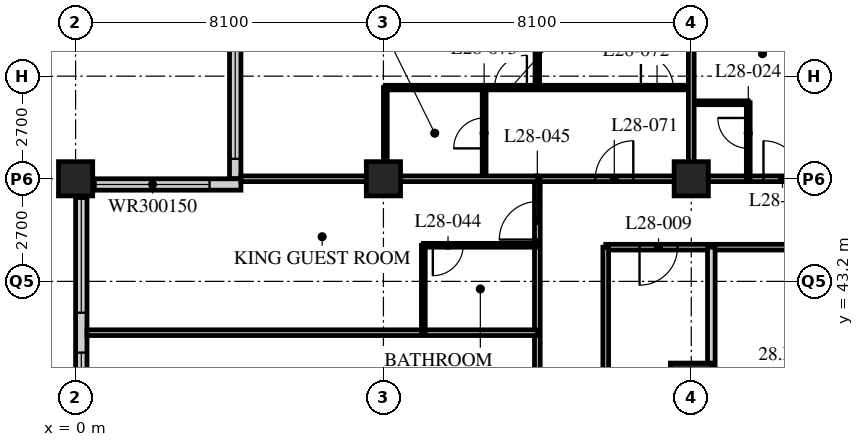
"""IFC4 building model, lengths in metres.
Left out: names, types, materials, properties, quantities, classifications, styles, units other than length and angle.
Written with IfcOpenShell. Run it as: python <this file> out.ifc"""

import sys

from ifc_helpers import new_model, si_unit, direction, frame, frame_2d, origin, origin_2d, place, context, subcontext, project, spatial, rectangle, hollow_rectangle, extrude, element, fill, save


model = new_model("IFC4")
c1 = context("Model", 3, precision=1e-05, world=origin(), true_north=direction((0.0, 1.0)))
c2 = subcontext(c1, "Body", "Model", "MODEL_VIEW")
j1 = project(units=[si_unit("LENGTHUNIT", "METRE"), si_unit("PLANEANGLEUNIT", "RADIAN")], contexts=[c1])
p1 = place(None, origin())
s1 = spatial("IfcSite", under=j1, at=p1, CompositionType="ELEMENT")
p2 = place(p1, origin())
s2 = spatial("IfcBuilding", under=s1, at=p2, CompositionType="ELEMENT")
p3 = place(p2, frame((0.0, 0.0, 113.6)))
s3 = spatial("IfcBuildingStorey", under=s2, at=p3, CompositionType="ELEMENT", Elevation=113.6)
for number, where, z_axis, x_axis in (
    (1, (0.0, 45.9, 0.0), (0.0, 0.0, 1.0), (1.0, 0.0, 0.0)),
    (2, (8.1, 45.9, 0.0), (0.0, 0.0, 1.0), (1.0, 0.0, 0.0)),
):
    element("IfcColumn", number, at=place(p3, frame(where, z_axis=z_axis, x_axis=x_axis)), inside=s3, PredefinedType="COLUMN", context=c2, shape_type="SweptSolid", body=[
        extrude(hollow_rectangle(XDim=0.9, YDim=0.9, WallThickness=0.09, at=origin_2d()), origin(), (0.0, 0.0, 1.0), 3.4),
    ])
p4 = place(p3, frame((16.2, 40.5, 0.0), z_axis=(0.0, 0.0, 1.0), x_axis=(1.0, 0.0, 0.0)))
e3 = element("IfcColumn", 3, at=p4, inside=s3, PredefinedType="COLUMN", context=c2, shape_type="SweptSolid", body=[
    extrude(hollow_rectangle(XDim=1.1, YDim=1.1, WallThickness=0.1, at=origin_2d()), origin(), (0.0, 0.0, 1.0), 3.4),
])
p5 = place(p3, frame((16.2, 45.9, 0.0), z_axis=(0.0, 0.0, 1.0), x_axis=(1.0, 0.0, 0.0)))
e4 = element("IfcColumn", 4, at=p5, inside=s3, PredefinedType="COLUMN", context=c2, shape_type="SweptSolid", body=[
    extrude(hollow_rectangle(XDim=0.9, YDim=0.9, WallThickness=0.09, at=origin_2d()), origin(), (0.0, 0.0, 1.0), 3.4),
])
p6 = place(p3, frame((4.2, 49.65, 0.0), z_axis=(0.0, 0.0, 1.0), x_axis=(0.0, -1.0, 0.0)))
e5 = element("IfcWall", 5, at=p6, inside=s3, PredefinedType="SOLIDWALL", context=c2, shape_type="SweptSolid", body=[
    extrude(rectangle(XDim=3.75, YDim=0.3, at=frame_2d((1.875, 0.0))), origin(), (0.0, 0.0, 1.0), 3.19),
])
p7 = place(p6, frame((0.225, 0.0, 0.9)))
e6 = element("IfcOpeningElement", 6, at=p7, cuts=e5, PredefinedType="OPENING", context=c2, shape_type="SweptSolid", body=[
    extrude(rectangle(XDim=3.0, YDim=1.5, at=frame_2d((1.5, 0.75))), frame((0.0, 0.16, 0.0), z_axis=(0.0, -1.0, 0.0), x_axis=(1.0, 0.0, 0.0)), (0.0, 0.0, 1.0), 0.32),
])
p8 = place(p3, frame((4.35, 45.75, 0.0), z_axis=(0.0, 0.0, 1.0), x_axis=(-1.0, 0.0, 0.0)))
e7 = element("IfcWall", 7, at=p8, inside=s3, PredefinedType="SOLIDWALL", context=c2, shape_type="SweptSolid", body=[
    extrude(rectangle(XDim=4.35, YDim=0.3, at=frame_2d((2.175, 0.0))), origin(), (0.0, 0.0, 1.0), 3.19),
])
p9 = place(p8, frame((0.825, 0.0, 0.9)))
e8 = element("IfcOpeningElement", 8, at=p9, cuts=e7, PredefinedType="OPENING", context=c2, shape_type="SweptSolid", body=[
    extrude(rectangle(XDim=3.0, YDim=1.5, at=frame_2d((1.5, 0.75))), frame((0.0, 0.16, 0.0), z_axis=(0.0, -1.0, 0.0), x_axis=(1.0, 0.0, 0.0)), (0.0, 0.0, 1.0), 0.32),
])
p10 = place(p3, frame((0.15, 45.6, 0.0), z_axis=(0.0, 0.0, 1.0), x_axis=(0.0, -1.0, 0.0)))
e9 = element("IfcWall", 9, at=p10, inside=s3, PredefinedType="SOLIDWALL", context=c2, shape_type="SweptSolid", body=[
    extrude(rectangle(XDim=32.1, YDim=0.3, at=frame_2d((16.05, 0.0))), origin(), (0.0, 0.0, 1.0), 3.19),
])
p11 = place(p10, frame((0.225, 0.0, 0.9)))
e10 = element("IfcOpeningElement", 10, at=p11, cuts=e9, PredefinedType="OPENING", context=c2, shape_type="SweptSolid", body=[
    extrude(rectangle(XDim=3.0, YDim=2.0, at=frame_2d((1.5, 1.0))), frame((0.0, 0.16, 0.0), z_axis=(0.0, -1.0, 0.0), x_axis=(1.0, 0.0, 0.0)), (0.0, 0.0, 1.0), 0.32),
])
p12 = place(p10, frame((4.275, 0.0, 0.9)))
e11 = element("IfcOpeningElement", 11, at=p12, cuts=e9, PredefinedType="OPENING", context=c2, shape_type="SweptSolid", body=[
    extrude(rectangle(XDim=3.0, YDim=2.0, at=frame_2d((1.5, 1.0))), frame((0.0, 0.16, 0.0), z_axis=(0.0, -1.0, 0.0), x_axis=(1.0, 0.0, 0.0)), (0.0, 0.0, 1.0), 0.32),
])
p13 = place(p10, frame((8.325, 0.0, 0.9)))
e12 = element("IfcOpeningElement", 12, at=p13, cuts=e9, PredefinedType="OPENING", context=c2, shape_type="SweptSolid", body=[
    extrude(rectangle(XDim=3.0, YDim=2.0, at=frame_2d((1.5, 1.0))), frame((0.0, 0.16, 0.0), z_axis=(0.0, -1.0, 0.0), x_axis=(1.0, 0.0, 0.0)), (0.0, 0.0, 1.0), 0.32),
])
p14 = place(p10, frame((12.375, 0.0, 0.9)))
e13 = element("IfcOpeningElement", 13, at=p14, cuts=e9, PredefinedType="OPENING", context=c2, shape_type="SweptSolid", body=[
    extrude(rectangle(XDim=3.0, YDim=2.0, at=frame_2d((1.5, 1.0))), frame((0.0, 0.16, 0.0), z_axis=(0.0, -1.0, 0.0), x_axis=(1.0, 0.0, 0.0)), (0.0, 0.0, 1.0), 0.32),
])
p15 = place(p10, frame((16.425, 0.0, 0.9)))
e14 = element("IfcOpeningElement", 14, at=p15, cuts=e9, PredefinedType="OPENING", context=c2, shape_type="SweptSolid", body=[
    extrude(rectangle(XDim=3.0, YDim=2.0, at=frame_2d((1.5, 1.0))), frame((0.0, 0.16, 0.0), z_axis=(0.0, -1.0, 0.0), x_axis=(1.0, 0.0, 0.0)), (0.0, 0.0, 1.0), 0.32),
])
p16 = place(p10, frame((20.475, 0.0, 0.9)))
e15 = element("IfcOpeningElement", 15, at=p16, cuts=e9, PredefinedType="OPENING", context=c2, shape_type="SweptSolid", body=[
    extrude(rectangle(XDim=3.0, YDim=2.0, at=frame_2d((1.5, 1.0))), frame((0.0, 0.16, 0.0), z_axis=(0.0, -1.0, 0.0), x_axis=(1.0, 0.0, 0.0)), (0.0, 0.0, 1.0), 0.32),
])
p17 = place(p10, frame((24.525, 0.0, 0.9)))
e16 = element("IfcOpeningElement", 16, at=p17, cuts=e9, PredefinedType="OPENING", context=c2, shape_type="SweptSolid", body=[
    extrude(rectangle(XDim=3.0, YDim=2.0, at=frame_2d((1.5, 1.0))), frame((0.0, 0.16, 0.0), z_axis=(0.0, -1.0, 0.0), x_axis=(1.0, 0.0, 0.0)), (0.0, 0.0, 1.0), 0.32),
])
p18 = place(p10, frame((28.575, 0.0, 0.9)))
e17 = element("IfcOpeningElement", 17, at=p18, cuts=e9, PredefinedType="OPENING", context=c2, shape_type="SweptSolid", body=[
    extrude(rectangle(XDim=3.0, YDim=2.0, at=frame_2d((1.5, 1.0))), frame((0.0, 0.16, 0.0), z_axis=(0.0, -1.0, 0.0), x_axis=(1.0, 0.0, 0.0)), (0.0, 0.0, 1.0), 0.32),
])
p19 = place(p3, frame((12.15, 45.9, 0.0), z_axis=(0.0, 0.0, 1.0), x_axis=(1.0, 0.0, 0.0)))
e18 = element("IfcWall", 18, at=p19, inside=s3, PredefinedType="PARTITIONING", context=c2, shape_type="SweptSolid", body=[
    extrude(rectangle(XDim=32.4, YDim=0.15, at=frame_2d((16.2, 0.0))), origin(), (0.0, 0.0, 1.0), 2.578),
])
p20 = place(p19, frame((5.95, 0.0, 0.0)))
e19 = element("IfcOpeningElement", 19, at=p20, cuts=e18, PredefinedType="OPENING", context=c2, shape_type="SweptSolid", body=[
    extrude(rectangle(XDim=1.0, YDim=2.1, at=frame_2d((0.5, 1.05))), frame((0.0, 0.085, 0.0), z_axis=(0.0, -1.0, 0.0), x_axis=(1.0, 0.0, 0.0)), (0.0, 0.0, 1.0), 0.17),
])
p21 = place(p19, frame((14.05, 0.0, 0.0)))
e20 = element("IfcOpeningElement", 20, at=p21, cuts=e18, PredefinedType="OPENING", context=c2, shape_type="SweptSolid", body=[
    extrude(rectangle(XDim=1.0, YDim=2.1, at=frame_2d((0.5, 1.05))), frame((0.0, 0.085, 0.0), z_axis=(0.0, -1.0, 0.0), x_axis=(1.0, 0.0, 0.0)), (0.0, 0.0, 1.0), 0.17),
])
p22 = place(p19, frame((25.7, 0.0, 0.0)))
e21 = element("IfcOpeningElement", 21, at=p22, cuts=e18, PredefinedType="OPENING", context=c2, shape_type="SweptSolid", body=[
    extrude(rectangle(XDim=1.0, YDim=2.1, at=frame_2d((0.5, 1.05))), frame((0.0, 0.085, 0.0), z_axis=(0.0, -1.0, 0.0), x_axis=(1.0, 0.0, 0.0)), (0.0, 0.0, 1.0), 0.17),
])
p23 = place(p19, frame((29.875, 0.0, 0.0)))
e22 = element("IfcOpeningElement", 22, at=p23, cuts=e18, PredefinedType="OPENING", context=c2, shape_type="SweptSolid", body=[
    extrude(rectangle(XDim=1.0, YDim=2.1, at=frame_2d((0.5, 1.05))), frame((0.0, 0.085, 0.0), z_axis=(0.0, -1.0, 0.0), x_axis=(1.0, 0.0, 0.0)), (0.0, 0.0, 1.0), 0.17),
])
p24 = place(p19, frame((1.525, 0.0, 0.0)))
e23 = element("IfcOpeningElement", 23, at=p24, cuts=e18, PredefinedType="OPENING", context=c2, shape_type="SweptSolid", body=[
    extrude(rectangle(XDim=1.0, YDim=2.1, at=frame_2d((0.5, 1.05))), frame((0.0, 0.085, 0.0), z_axis=(0.0, -1.0, 0.0), x_axis=(1.0, 0.0, 0.0)), (0.0, 0.0, 1.0), 0.17),
])
p25 = place(p3, frame((12.15, 17.55, 0.0), z_axis=(0.0, 0.0, 1.0), x_axis=(0.0, 1.0, 0.0)))
e24 = element("IfcWall", 24, at=p25, inside=s3, PredefinedType="PARTITIONING", context=c2, shape_type="SweptSolid", body=[
    extrude(rectangle(XDim=28.35, YDim=0.15, at=frame_2d((14.175, 0.0))), origin(), (0.0, 0.0, 1.0), 3.19),
])
p26 = place(p25, frame((5.45, 0.0, 0.0)))
e25 = element("IfcOpeningElement", 25, at=p26, cuts=e24, PredefinedType="OPENING", context=c2, shape_type="SweptSolid", body=[
    extrude(rectangle(XDim=1.0, YDim=2.1, at=frame_2d((0.5, 1.05))), frame((0.0, 0.085, 0.0), z_axis=(0.0, -1.0, 0.0), x_axis=(1.0, 0.0, 0.0)), (0.0, 0.0, 1.0), 0.17),
])
p27 = place(p25, frame((13.55, 0.0, 0.0)))
e26 = element("IfcOpeningElement", 26, at=p27, cuts=e24, PredefinedType="OPENING", context=c2, shape_type="SweptSolid", body=[
    extrude(rectangle(XDim=1.0, YDim=2.1, at=frame_2d((0.5, 1.05))), frame((0.0, 0.085, 0.0), z_axis=(0.0, -1.0, 0.0), x_axis=(1.0, 0.0, 0.0)), (0.0, 0.0, 1.0), 0.17),
])
p28 = place(p25, frame((21.65, 0.0, 0.0)))
e27 = element("IfcOpeningElement", 27, at=p28, cuts=e24, PredefinedType="OPENING", context=c2, shape_type="SweptSolid", body=[
    extrude(rectangle(XDim=1.0, YDim=2.1, at=frame_2d((0.5, 1.05))), frame((0.0, 0.085, 0.0), z_axis=(0.0, -1.0, 0.0), x_axis=(1.0, 0.0, 0.0)), (0.0, 0.0, 1.0), 0.17),
])
p29 = place(p25, frame((26.75, 0.0, 0.0)))
e28 = element("IfcOpeningElement", 28, at=p29, cuts=e24, PredefinedType="OPENING", context=c2, shape_type="SweptSolid", body=[
    extrude(rectangle(XDim=1.0, YDim=2.1, at=frame_2d((0.5, 1.05))), frame((0.0, 0.085, 0.0), z_axis=(0.0, -1.0, 0.0), x_axis=(1.0, 0.0, 0.0)), (0.0, 0.0, 1.0), 0.17),
])
p30 = place(p3, frame((27.14, 44.1, 0.0), z_axis=(0.0, 0.0, 1.0), x_axis=(-1.0, 0.0, 0.0)))
e29 = element("IfcWall", 29, at=p30, inside=s3, PredefinedType="PARTITIONING", context=c2, shape_type="SweptSolid", body=[
    extrude(rectangle(XDim=13.19, YDim=0.15, at=frame_2d((6.595, 0.0))), origin(), (0.0, 0.0, 1.0), 3.19),
])
p31 = place(p30, frame((11.301, 0.0, 0.0)))
e30 = element("IfcOpeningElement", 30, at=p31, cuts=e29, PredefinedType="OPENING", context=c2, shape_type="SweptSolid", body=[
    extrude(rectangle(XDim=1.0, YDim=2.1, at=frame_2d((0.5, 1.05))), frame((0.0, 0.085, 0.0), z_axis=(0.0, -1.0, 0.0), x_axis=(1.0, 0.0, 0.0)), (0.0, 0.0, 1.0), 0.17),
])
p32 = place(p30, frame((4.701, 0.0, 0.0)))
e31 = element("IfcOpeningElement", 31, at=p32, cuts=e29, PredefinedType="OPENING", context=c2, shape_type="SweptSolid", body=[
    extrude(rectangle(XDim=1.0, YDim=2.1, at=frame_2d((0.5, 1.05))), frame((0.0, 0.085, 0.0), z_axis=(0.0, -1.0, 0.0), x_axis=(1.0, 0.0, 0.0)), (0.0, 0.0, 1.0), 0.17),
])
p33 = place(p3, frame((13.95, 44.1, 0.0), z_axis=(0.0, 0.0, 1.0), x_axis=(0.0, -1.0, 0.0)))
e32 = element("IfcWall", 32, at=p33, inside=s3, PredefinedType="PARTITIONING", context=c2, shape_type="SweptSolid", body=[
    extrude(rectangle(XDim=24.75, YDim=0.15, at=frame_2d((12.375, 0.0))), origin(), (0.0, 0.0, 1.0), 3.19),
])
p34 = place(p33, frame((15.25, 0.0, 0.0)))
e33 = element("IfcOpeningElement", 33, at=p34, cuts=e32, PredefinedType="OPENING", context=c2, shape_type="SweptSolid", body=[
    extrude(rectangle(XDim=1.0, YDim=2.1, at=frame_2d((0.5, 1.05))), frame((0.0, 0.085, 0.0), z_axis=(0.0, -1.0, 0.0), x_axis=(1.0, 0.0, 0.0)), (0.0, 0.0, 1.0), 0.17),
])
p35 = place(p33, frame((7.15, 0.0, 0.0)))
e34 = element("IfcOpeningElement", 34, at=p35, cuts=e32, PredefinedType="OPENING", context=c2, shape_type="SweptSolid", body=[
    extrude(rectangle(XDim=1.0, YDim=2.1, at=frame_2d((0.5, 1.05))), frame((0.0, 0.085, 0.0), z_axis=(0.0, -1.0, 0.0), x_axis=(1.0, 0.0, 0.0)), (0.0, 0.0, 1.0), 0.17),
])
p36 = place(p3, frame((16.728, 44.1, 0.0), z_axis=(0.0, 0.0, 1.0), x_axis=(0.0, -1.0, 0.0)))
e35 = element("IfcWall", 35, at=p36, inside=s3, PredefinedType="SOLIDWALL", context=c2, shape_type="SweptSolid", body=[
    extrude(rectangle(XDim=3.6, YDim=0.2, at=frame_2d((1.8, 0.0))), origin(), (0.0, 0.0, 1.0), 3.19),
])
p37 = place(p3, frame((16.2, 47.9, 0.0), z_axis=(0.0, 0.0, 1.0), x_axis=(1.0, 0.0, 0.0)))
e36 = element("IfcWall", 36, at=p37, inside=s3, PredefinedType="PARTITIONING", context=c2, shape_type="SweptSolid", body=[
    extrude(rectangle(XDim=1.5, YDim=0.1, at=frame_2d((0.75, 0.0))), origin(), (0.0, 0.0, 1.0), 3.19),
])
p38 = place(p3, frame((17.7, 45.9, 0.0), z_axis=(0.0, 0.0, 1.0), x_axis=(0.0, 1.0, 0.0)))
e37 = element("IfcWall", 37, at=p38, inside=s3, PredefinedType="PARTITIONING", context=c2, shape_type="SweptSolid", body=[
    extrude(rectangle(XDim=2.0, YDim=0.1, at=frame_2d((1.0, 0.0))), origin(), (0.0, 0.0, 1.0), 3.19),
])
p39 = place(p38, frame((0.8, 0.0, 0.0)))
e38 = element("IfcOpeningElement", 38, at=p39, cuts=e37, PredefinedType="OPENING", context=c2, shape_type="SweptSolid", body=[
    extrude(rectangle(XDim=0.8, YDim=2.1, at=frame_2d((0.4, 1.05))), frame((0.0, 0.06, 0.0), z_axis=(0.0, -1.0, 0.0), x_axis=(1.0, 0.0, 0.0)), (0.0, 0.0, 1.0), 0.12),
])
p40 = place(p3, frame((12.15, 41.85, 0.0), z_axis=(0.0, 0.0, 1.0), x_axis=(-1.0, 0.0, 0.0)))
e39 = element("IfcWall", 39, at=p40, inside=s3, PredefinedType="PARTITIONING", context=c2, shape_type="SweptSolid", body=[
    extrude(rectangle(XDim=11.85, YDim=0.15, at=frame_2d((5.925, 0.0))), origin(), (0.0, 0.0, 1.0), 3.19),
])
p41 = place(p3, frame((9.15, 41.85, 0.0), z_axis=(0.0, 0.0, 1.0), x_axis=(0.0, 1.0, 0.0)))
e40 = element("IfcWall", 40, at=p41, inside=s3, PredefinedType="PARTITIONING", context=c2, shape_type="SweptSolid", body=[
    extrude(rectangle(XDim=2.3, YDim=0.1, at=frame_2d((1.15, 0.0))), origin(), (0.0, 0.0, 1.0), 3.19),
])
p42 = place(p3, frame((12.15, 44.15, 0.0), z_axis=(0.0, 0.0, 1.0), x_axis=(-1.0, 0.0, 0.0)))
e41 = element("IfcWall", 41, at=p42, inside=s3, PredefinedType="PARTITIONING", context=c2, shape_type="SweptSolid", body=[
    extrude(rectangle(XDim=3.0, YDim=0.1, at=frame_2d((1.5, 0.0))), origin(), (0.0, 0.0, 1.0), 3.19),
])
p43 = place(p42, frame((1.95, 0.0, 0.0)))
e42 = element("IfcOpeningElement", 42, at=p43, cuts=e41, PredefinedType="OPENING", context=c2, shape_type="SweptSolid", body=[
    extrude(rectangle(XDim=0.8, YDim=2.1, at=frame_2d((0.4, 1.05))), frame((0.0, 0.06, 0.0), z_axis=(0.0, -1.0, 0.0), x_axis=(1.0, 0.0, 0.0)), (0.0, 0.0, 1.0), 0.12),
])
p44 = place(p3, frame((10.75, 45.9, 0.0), z_axis=(0.0, 0.0, 1.0), x_axis=(0.0, 1.0, 0.0)))
e43 = element("IfcWall", 43, at=p44, inside=s3, PredefinedType="PARTITIONING", context=c2, shape_type="SweptSolid", body=[
    extrude(rectangle(XDim=2.4, YDim=0.1, at=frame_2d((1.2, 0.0))), origin(), (0.0, 0.0, 1.0), 3.19),
])
p45 = place(p44, frame((0.8, 0.0, 0.0)))
e44 = element("IfcOpeningElement", 44, at=p45, cuts=e43, PredefinedType="OPENING", context=c2, shape_type="SweptSolid", body=[
    extrude(rectangle(XDim=0.8, YDim=2.1, at=frame_2d((0.4, 1.05))), frame((0.0, 0.06, 0.0), z_axis=(0.0, -1.0, 0.0), x_axis=(1.0, 0.0, 0.0)), (0.0, 0.0, 1.0), 0.12),
])
p46 = place(p3, frame((8.15, 45.9, 0.0), z_axis=(0.0, 0.0, 1.0), x_axis=(0.0, 1.0, 0.0)))
e45 = element("IfcWall", 45, at=p46, inside=s3, PredefinedType="PARTITIONING", context=c2, shape_type="SweptSolid", body=[
    extrude(rectangle(XDim=2.4, YDim=0.1, at=frame_2d((1.2, 0.0))), origin(), (0.0, 0.0, 1.0), 2.578),
])
p47 = place(p3, frame((8.15, 48.3, 0.0), z_axis=(0.0, 0.0, 1.0), x_axis=(1.0, 0.0, 0.0)))
e46 = element("IfcWall", 46, at=p47, inside=s3, PredefinedType="PARTITIONING", context=c2, shape_type="SweptSolid", body=[
    extrude(rectangle(XDim=8.05, YDim=0.12, at=frame_2d((4.025, 0.0))), origin(), (0.0, 0.0, 1.0), 3.19),
])
p48 = place(p47, frame((6.725, 0.0, 0.0)))
e47 = element("IfcOpeningElement", 47, at=p48, cuts=e46, PredefinedType="OPENING", context=c2, shape_type="SweptSolid", body=[
    extrude(rectangle(XDim=0.85, YDim=2.1, at=frame_2d((0.425, 1.05))), frame((0.0, 0.07, 0.0), z_axis=(0.0, -1.0, 0.0), x_axis=(1.0, 0.0, 0.0)), (0.0, 0.0, 1.0), 0.14),
])
p49 = place(p47, frame((2.875, 0.0, 0.0)))
e48 = element("IfcOpeningElement", 48, at=p49, cuts=e46, PredefinedType="OPENING", context=c2, shape_type="SweptSolid", body=[
    extrude(rectangle(XDim=0.85, YDim=2.1, at=frame_2d((0.425, 1.05))), frame((0.0, 0.07, 0.0), z_axis=(0.0, -1.0, 0.0), x_axis=(1.0, 0.0, 0.0)), (0.0, 0.0, 1.0), 0.14),
])
p50 = place(p3, frame((12.15, 48.3, 0.0), z_axis=(0.0, 0.0, 1.0), x_axis=(0.0, 1.0, 0.0)))
e49 = element("IfcWall", 49, at=p50, inside=s3, PredefinedType="PARTITIONING", context=c2, shape_type="SweptSolid", body=[
    extrude(rectangle(XDim=5.4, YDim=0.12, at=frame_2d((2.7, 0.0))), origin(), (0.0, 0.0, 1.0), 3.19),
])
p51 = place(p3, frame((4.35, 45.9, 0.0), z_axis=(0.0, 0.0, 1.0), x_axis=(1.0, 0.0, 0.0)))
e50 = element("IfcWall", 50, at=p51, inside=s3, PredefinedType="PARTITIONING", context=c2, shape_type="SweptSolid", body=[
    extrude(rectangle(XDim=7.8, YDim=0.15, at=frame_2d((3.9, 0.0))), origin(), (0.0, 0.0, 1.0), 2.578),
])
p52 = place(p3, frame((16.2, 45.9, 0.0), z_axis=(0.0, 0.0, 1.0), x_axis=(0.0, 1.0, 0.0)))
e51 = element("IfcWall", 51, at=p52, inside=s3, PredefinedType="PARTITIONING", context=c2, shape_type="SweptSolid", body=[
    extrude(rectangle(XDim=7.8, YDim=0.15, at=frame_2d((3.9, 0.0))), origin(), (0.0, 0.0, 1.0), 2.578),
])
p53 = place(p7, origin())
e52 = element("IfcWindow", 52, at=p53, inside=s3, PartitioningType="SINGLE_PANEL", PredefinedType="WINDOW", context=c2, shape_type="SweptSolid", body=[
    extrude(rectangle(XDim=3.0, YDim=1.5, at=frame_2d((1.5, 0.75))), frame((0.0, 0.03, 0.0), z_axis=(0.0, -1.0, 0.0), x_axis=(1.0, 0.0, 0.0)), (0.0, 0.0, 1.0), 0.06),
])
fill(e6, e52)
p54 = place(p9, origin())
e53 = element("IfcWindow", 53, at=p54, inside=s3, PartitioningType="SINGLE_PANEL", PredefinedType="WINDOW", context=c2, shape_type="SweptSolid", body=[
    extrude(rectangle(XDim=3.0, YDim=1.5, at=frame_2d((1.5, 0.75))), frame((0.0, 0.03, 0.0), z_axis=(0.0, -1.0, 0.0), x_axis=(1.0, 0.0, 0.0)), (0.0, 0.0, 1.0), 0.06),
])
fill(e8, e53)
p55 = place(p11, origin())
e54 = element("IfcWindow", 54, at=p55, inside=s3, PartitioningType="SINGLE_PANEL", PredefinedType="WINDOW", context=c2, shape_type="SweptSolid", body=[
    extrude(rectangle(XDim=3.0, YDim=2.0, at=frame_2d((1.5, 1.0))), frame((0.0, 0.03, 0.0), z_axis=(0.0, -1.0, 0.0), x_axis=(1.0, 0.0, 0.0)), (0.0, 0.0, 1.0), 0.06),
])
fill(e10, e54)
p56 = place(p12, origin())
e55 = element("IfcWindow", 55, at=p56, inside=s3, PartitioningType="SINGLE_PANEL", PredefinedType="WINDOW", context=c2, shape_type="SweptSolid", body=[
    extrude(rectangle(XDim=3.0, YDim=2.0, at=frame_2d((1.5, 1.0))), frame((0.0, 0.03, 0.0), z_axis=(0.0, -1.0, 0.0), x_axis=(1.0, 0.0, 0.0)), (0.0, 0.0, 1.0), 0.06),
])
fill(e11, e55)
p57 = place(p31, origin())
e56 = element("IfcDoor", 56, at=p57, inside=s3, OperationType="SINGLE_SWING_RIGHT", PredefinedType="DOOR", context=c2, shape_type="SweptSolid", body=[
    extrude(rectangle(XDim=1.0, YDim=2.1, at=frame_2d((0.5, 1.05))), frame((0.0, 0.025, 0.0), z_axis=(0.0, -1.0, 0.0), x_axis=(1.0, 0.0, 0.0)), (0.0, 0.0, 1.0), 0.05),
])
fill(e30, e56)
p58 = place(p39, origin())
e57 = element("IfcDoor", 57, at=p58, inside=s3, OperationType="SINGLE_SWING_RIGHT", PredefinedType="DOOR", context=c2, shape_type="SweptSolid", body=[
    extrude(rectangle(XDim=0.8, YDim=2.1, at=frame_2d((0.4, 1.05))), frame((0.0, 0.025, 0.0), z_axis=(0.0, -1.0, 0.0), x_axis=(1.0, 0.0, 0.0)), (0.0, 0.0, 1.0), 0.05),
])
fill(e38, e57)
p59 = place(p20, origin())
e58 = element("IfcDoor", 58, at=p59, inside=s3, OperationType="SINGLE_SWING_LEFT", PredefinedType="DOOR", context=c2, shape_type="SweptSolid", body=[
    extrude(rectangle(XDim=1.0, YDim=2.1, at=frame_2d((0.5, 1.05))), frame((0.0, 0.025, 0.0), z_axis=(0.0, -1.0, 0.0), x_axis=(1.0, 0.0, 0.0)), (0.0, 0.0, 1.0), 0.05),
])
fill(e19, e58)
p60 = place(p43, origin())
e59 = element("IfcDoor", 59, at=p60, inside=s3, OperationType="SINGLE_SWING_RIGHT", PredefinedType="DOOR", context=c2, shape_type="SweptSolid", body=[
    extrude(rectangle(XDim=0.8, YDim=2.1, at=frame_2d((0.4, 1.05))), frame((0.0, 0.025, 0.0), z_axis=(0.0, -1.0, 0.0), x_axis=(1.0, 0.0, 0.0)), (0.0, 0.0, 1.0), 0.05),
])
fill(e42, e59)
p61 = place(p29, origin())
e60 = element("IfcDoor", 60, at=p61, inside=s3, OperationType="SINGLE_SWING_LEFT", PredefinedType="DOOR", context=c2, shape_type="SweptSolid", body=[
    extrude(rectangle(XDim=1.0, YDim=2.1, at=frame_2d((0.5, 1.05))), frame((0.0, 0.025, 0.0), z_axis=(0.0, -1.0, 0.0), x_axis=(1.0, 0.0, 0.0)), (0.0, 0.0, 1.0), 0.05),
])
fill(e28, e60)
p62 = place(p24, origin())
e61 = element("IfcDoor", 61, at=p62, inside=s3, OperationType="SINGLE_SWING_RIGHT", PredefinedType="DOOR", context=c2, shape_type="SweptSolid", body=[
    extrude(rectangle(XDim=1.0, YDim=2.1, at=frame_2d((0.5, 1.05))), frame((0.0, 0.025, 0.0), z_axis=(0.0, -1.0, 0.0), x_axis=(1.0, 0.0, 0.0)), (0.0, 0.0, 1.0), 0.05),
])
fill(e23, e61)
p63 = place(p48, origin())
e62 = element("IfcDoor", 62, at=p63, inside=s3, OperationType="SINGLE_SWING_LEFT", PredefinedType="DOOR", context=c2, shape_type="SweptSolid", body=[
    extrude(rectangle(XDim=0.85, YDim=2.1, at=frame_2d((0.425, 1.05))), frame((0.0, 0.025, 0.0), z_axis=(0.0, -1.0, 0.0), x_axis=(1.0, 0.0, 0.0)), (0.0, 0.0, 1.0), 0.05),
])
fill(e47, e62)
p64 = place(p45, origin())
e63 = element("IfcDoor", 63, at=p64, inside=s3, OperationType="SINGLE_SWING_LEFT", PredefinedType="DOOR", context=c2, shape_type="SweptSolid", body=[
    extrude(rectangle(XDim=0.8, YDim=2.1, at=frame_2d((0.4, 1.05))), frame((0.0, 0.025, 0.0), z_axis=(0.0, -1.0, 0.0), x_axis=(1.0, 0.0, 0.0)), (0.0, 0.0, 1.0), 0.05),
])
fill(e44, e63)
p65 = place(p49, origin())
e64 = element("IfcDoor", 64, at=p65, inside=s3, OperationType="SINGLE_SWING_RIGHT", PredefinedType="DOOR", context=c2, shape_type="SweptSolid", body=[
    extrude(rectangle(XDim=0.85, YDim=2.1, at=frame_2d((0.425, 1.05))), frame((0.0, 0.025, 0.0), z_axis=(0.0, -1.0, 0.0), x_axis=(1.0, 0.0, 0.0)), (0.0, 0.0, 1.0), 0.05),
])
fill(e48, e64)
save(model, sys.argv[1])
